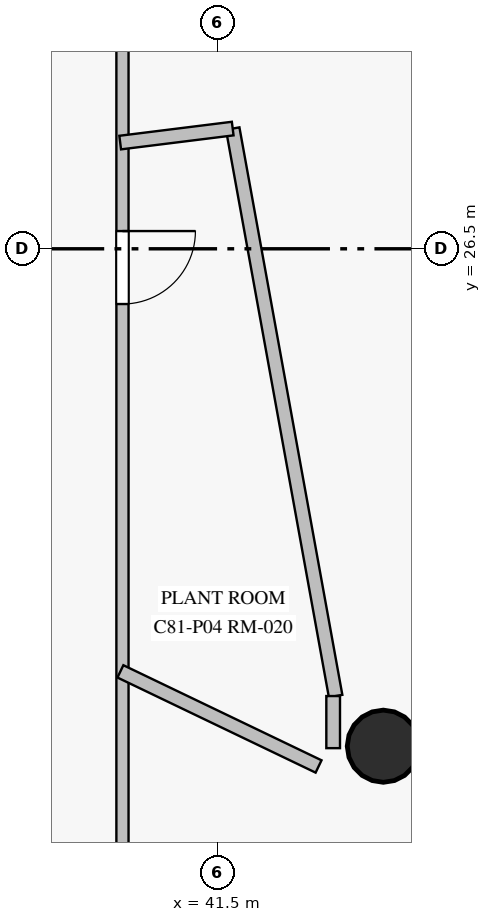
"""IFC4 building model, lengths in metres.
Left out: names, types, materials, properties, quantities, classifications, styles, units other than length and angle.
Written with IfcOpenShell. Run it as: python <this file> out.ifc"""

import sys

from ifc_helpers import new_model, si_unit, direction, frame, frame_2d, origin, origin_with_axes, origin_2d, place, context, subcontext, project, spatial, rectangle, circle, extrude, source, transform, mapped, element, fill, save


model = new_model("IFC4")
c1 = context("Model", 3, precision=1e-05, world=origin(), true_north=direction((0.0, 1.0)))
c2 = subcontext(c1, "Body", "Model", "MODEL_VIEW")
j1 = project(units=[si_unit("LENGTHUNIT", "METRE"), si_unit("PLANEANGLEUNIT", "RADIAN")], contexts=[c1])
p1 = place(None, origin())
s1 = spatial("IfcSite", under=j1, at=p1, CompositionType="ELEMENT")
p2 = place(p1, origin())
s2 = spatial("IfcBuilding", under=s1, at=p2, CompositionType="ELEMENT")
p3 = place(p2, frame((0.0, 0.0, 273.4)))
s3 = spatial("IfcBuildingStorey", under=s2, at=p3, CompositionType="ELEMENT", Elevation=273.4)
m1 = source(origin_with_axes(), c2, "Body", "SweptSolid", [
    extrude(circle(Radius=0.475, at=origin_2d()), origin(), (0.0, 0.0, 1.0), 16.6),
])
p4 = place(p3, frame((43.682, 19.956, 0.0), z_axis=(0.0, 0.0, 1.0), x_axis=(1.0, 0.0, 0.0)))
e1 = element("IfcColumn", 1, at=p4, inside=s3, PredefinedType="COLUMN", context=c2, shape_type="MappedRepresentation", body=[
    mapped(m1, transform((0.0, 0.0, 0.0), scale=1.0)),
])
p5 = place(p3, frame((42.88, 15.242, 0.0), z_axis=(0.0, 0.0, 1.0), x_axis=(0.520364089318, 0.853944503202, 0.0)))
e2 = element("IfcWall", 2, at=p5, inside=s3, PredefinedType="SOLIDWALL", context=c2, shape_type="SweptSolid", body=[
    extrude(rectangle(XDim=8.688, YDim=0.3, at=frame_2d((4.344, 0.0))), origin(), (0.0, 0.0, 1.0), 16.35),
])
p6 = place(p3, frame((40.25, 37.16, 0.0), z_axis=(0.0, 0.0, 1.0), x_axis=(0.0, -1.0, 0.0)))
e3 = element("IfcWall", 3, at=p6, inside=s3, PredefinedType="PARTITIONING", context=c2, shape_type="SweptSolid", body=[
    extrude(rectangle(XDim=21.804, YDim=0.16, at=frame_2d((10.902, 0.0))), origin(), (0.0, 0.0, 1.0), 15.65),
])
p7 = place(p6, frame((10.427, 0.0, 0.0)))
e4 = element("IfcOpeningElement", 4, at=p7, cuts=e3, PredefinedType="OPENING", context=c2, shape_type="SweptSolid", body=[
    extrude(rectangle(XDim=0.96, YDim=2.15, at=frame_2d((0.48, 1.075))), frame((0.0, 0.09, 0.0), z_axis=(0.0, -1.0, 0.0), x_axis=(1.0, 0.0, 0.0)), (0.0, 0.0, 1.0), 0.18),
])
p8 = place(p3, frame((41.7, 28.082, 0.0), z_axis=(0.0, 0.0, 1.0), x_axis=(0.178455018212, -0.983948071026, 0.0)))
e5 = element("IfcWall", 5, at=p8, inside=s3, PredefinedType="PARTITIONING", context=c2, shape_type="SweptSolid", body=[
    extrude(rectangle(XDim=7.587, YDim=0.18, at=frame_2d((3.794, 0.0))), origin(), (0.0, 0.0, 1.0), 15.65),
])
p9 = place(p3, frame((42.83, 19.69, 0.0), z_axis=(0.0, 0.0, 1.0), x_axis=(-0.901570483587, 0.432632249288, 0.0)))
e6 = element("IfcWall", 6, at=p9, inside=s3, PredefinedType="PARTITIONING", context=c2, shape_type="SweptSolid", body=[
    extrude(rectangle(XDim=2.892, YDim=0.18, at=frame_2d((1.446, 0.0))), origin(), (0.0, 0.0, 1.0), 15.65),
])
p10 = place(p3, frame((40.22, 27.897, 0.0), z_axis=(0.0, 0.0, 1.0), x_axis=(0.992353246761, 0.123430278466, 0.0)))
e7 = element("IfcWall", 7, at=p10, inside=s3, PredefinedType="PARTITIONING", context=c2, shape_type="SweptSolid", body=[
    extrude(rectangle(XDim=1.491, YDim=0.18, at=frame_2d((0.746, 0.0))), origin(), (0.0, 0.0, 1.0), 16.35),
])
p11 = place(p3, frame((43.022, 20.616, 0.0), z_axis=(0.0, 0.0, 1.0), x_axis=(0.0, -1.0, 0.0)))
e8 = element("IfcWall", 8, at=p11, inside=s3, PredefinedType="PARTITIONING", context=c2, shape_type="SweptSolid", body=[
    extrude(rectangle(XDim=0.686, YDim=0.18, at=frame_2d((0.343, 0.0))), origin(), (0.0, 0.0, 1.0), 15.65),
])
m2 = source(origin_with_axes(), c2, "Body", "SweptSolid", [
    extrude(rectangle(XDim=0.96, YDim=2.15, at=frame_2d((0.48, 1.075))), frame((0.0, 0.025, 0.0), z_axis=(0.0, -1.0, 0.0), x_axis=(1.0, 0.0, 0.0)), (0.0, 0.0, 1.0), 0.05),
])
p12 = place(p7, origin())
e9 = element("IfcDoor", 9, at=p12, inside=s3, OperationType="SINGLE_SWING_LEFT", PredefinedType="DOOR", context=c2, shape_type="MappedRepresentation", body=[
    mapped(m2, transform((0.0, 0.0, 0.0), scale=1.0)),
])
fill(e4, e9)
save(model, sys.argv[1])
